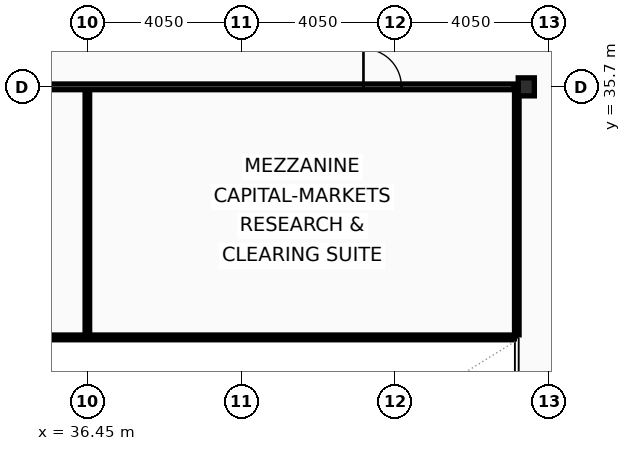
"""IFC4 building model, lengths in metres.
Left out: names, types, materials, properties, quantities, classifications, styles, units other than length and angle.
Written with IfcOpenShell. Run it as: python <this file> out.ifc"""

import sys

from ifc_helpers import new_model, si_unit, direction, frame, frame_2d, origin, origin_2d, place, context, subcontext, project, spatial, rectangle, i_section, extrude, element, fill, save


model = new_model("IFC4")
c1 = context("Model", 3, precision=1e-05, world=origin(), true_north=direction((0.0, 1.0)))
c2 = subcontext(c1, "Body", "Model", "MODEL_VIEW")
j1 = project(units=[si_unit("LENGTHUNIT", "METRE"), si_unit("PLANEANGLEUNIT", "RADIAN")], contexts=[c1])
p1 = place(None, origin())
s1 = spatial("IfcSite", under=j1, at=p1, CompositionType="ELEMENT")
p2 = place(p1, origin())
s2 = spatial("IfcBuilding", under=s1, at=p2, CompositionType="ELEMENT")
p3 = place(p2, frame((0.0, 0.0, 15.4)))
s3 = spatial("IfcBuildingStorey", under=s2, at=p3, CompositionType="ELEMENT", Elevation=15.4)
p4 = place(p3, frame((48.0, 35.7, 0.0), z_axis=(0.0, 0.0, 1.0), x_axis=(1.0, 0.0, 0.0)))
e1 = element("IfcColumn", 1, at=p4, inside=s3, PredefinedType="COLUMN", context=c2, shape_type="SweptSolid", body=[
    extrude(i_section(OverallWidth=0.424, OverallDepth=0.474, WebThickness=0.048, FlangeThickness=0.077, at=origin_2d()), origin(), (0.0, 0.0, 1.0), 5.0),
])
p5 = place(p3, frame((25.215, 29.12, 0.0), z_axis=(0.0, 0.0, 1.0), x_axis=(1.0, 0.0, 0.0)))
e2 = element("IfcWall", 2, at=p5, inside=s3, PredefinedType="MOVABLE", context=c2, shape_type="SweptSolid", body=[
    extrude(rectangle(XDim=22.47, YDim=0.1, at=frame_2d((11.235, 0.0))), origin(), (0.0, 0.0, 1.0), 3.87),
])
p6 = place(p3, frame((36.45, 29.175, 0.0), z_axis=(0.0, 0.0, 1.0), x_axis=(0.0, 1.0, 0.0)))
e3 = element("IfcWall", 3, at=p6, inside=s3, PredefinedType="PARTITIONING", context=c2, shape_type="SweptSolid", body=[
    extrude(rectangle(XDim=6.445, YDim=0.12, at=frame_2d((3.223, 0.0))), origin(), (0.0, 0.0, 1.0), 4.17),
])
p7 = place(p3, frame((25.215, 35.7, 0.0), z_axis=(0.0, 0.0, 1.0), x_axis=(1.0, 0.0, 0.0)))
e4 = element("IfcWall", 4, at=p7, inside=s3, PredefinedType="PARTITIONING", context=c2, shape_type="SweptSolid", body=[
    extrude(rectangle(XDim=22.47, YDim=0.15, at=frame_2d((11.235, 0.0))), origin(), (0.0, 0.0, 1.0), 3.87),
])
p8 = place(p7, frame((6.0, 0.0, 0.0)))
e5 = element("IfcOpeningElement", 5, at=p8, cuts=e4, PredefinedType="OPENING", context=c2, shape_type="SweptSolid", body=[
    extrude(rectangle(XDim=1.0, YDim=2.05, at=frame_2d((0.5, 1.025))), frame((0.0, 0.085, 0.0), z_axis=(0.0, -1.0, 0.0), x_axis=(1.0, 0.0, 0.0)), (0.0, 0.0, 1.0), 0.17),
])
p9 = place(p7, frame((18.5, 0.0, 0.0)))
e6 = element("IfcOpeningElement", 6, at=p9, cuts=e4, PredefinedType="OPENING", context=c2, shape_type="SweptSolid", body=[
    extrude(rectangle(XDim=1.0, YDim=2.05, at=frame_2d((0.5, 1.025))), frame((0.0, 0.085, 0.0), z_axis=(0.0, -1.0, 0.0), x_axis=(1.0, 0.0, 0.0)), (0.0, 0.0, 1.0), 0.17),
])
p10 = place(p3, frame((47.75, 29.175, 0.0), z_axis=(0.0, 0.0, 1.0), x_axis=(0.0, 1.0, 0.0)))
e7 = element("IfcWall", 7, at=p10, inside=s3, PredefinedType="PARTITIONING", context=c2, shape_type="SweptSolid", body=[
    extrude(rectangle(XDim=6.445, YDim=0.12, at=frame_2d((3.223, 0.0))), origin(), (0.0, 0.0, 1.0), 3.87),
])
p11 = place(p9, origin())
e8 = element("IfcDoor", 8, at=p11, inside=s3, OperationType="SINGLE_SWING_LEFT", PredefinedType="DOOR", context=c2, shape_type="SweptSolid", body=[
    extrude(rectangle(XDim=1.0, YDim=2.05, at=frame_2d((0.5, 1.025))), frame((0.0, 0.025, 0.0), z_axis=(0.0, -1.0, 0.0), x_axis=(1.0, 0.0, 0.0)), (0.0, 0.0, 1.0), 0.05),
])
fill(e6, e8)
save(model, sys.argv[1])
